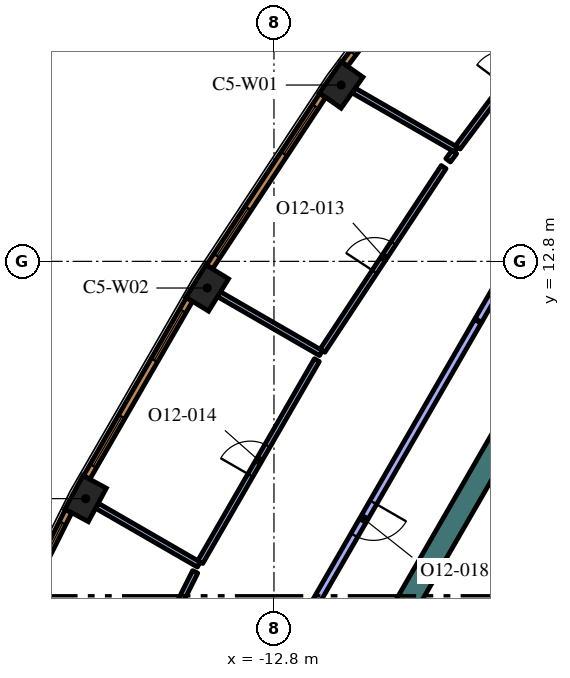
"""IFC4 building model, lengths in metres.
Left out: names, types, materials, properties, quantities, classifications, styles, units other than length and angle.
Written with IfcOpenShell. Run it as: python <this file> out.ifc"""

import sys

from ifc_helpers import new_model, si_unit, direction, frame, frame_2d, origin, origin_2d, place, context, subcontext, project, spatial, polyline, rectangle, outline, extrude, element, fill, save


model = new_model("IFC4")
c1 = context("Model", 3, precision=1e-05, world=origin(), true_north=direction((0.0, 1.0)))
c2 = subcontext(c1, "Body", "Model", "MODEL_VIEW")
j1 = project(units=[si_unit("LENGTHUNIT", "METRE"), si_unit("PLANEANGLEUNIT", "RADIAN")], contexts=[c1])
p1 = place(None, origin())
s1 = spatial("IfcSite", under=j1, at=p1, CompositionType="ELEMENT")
p2 = place(p1, origin())
s2 = spatial("IfcBuilding", under=s1, at=p2, CompositionType="ELEMENT")
p3 = place(p2, frame((0.0, 0.0, 283.8)))
s3 = spatial("IfcBuildingStorey", under=s2, at=p3, CompositionType="ELEMENT", Elevation=283.8)
for number, where, z_axis, x_axis in (
    (1, (-11.032, 17.44, 0.0), (0.0, 0.0, 1.0), (-0.575, -0.818, 0.0)),
    (2, (-14.556, 12.098, 0.0), (0.0, 0.0, 1.0), (-0.526, -0.851, 0.0)),
    (3, (-17.756, 6.557, 0.0), (0.0, 0.0, 1.0), (-0.474, -0.881, 0.0)),
):
    element("IfcColumn", number, at=place(p3, frame(where, z_axis=z_axis, x_axis=x_axis)), inside=s3, PredefinedType="COLUMN", context=c2, shape_type="SweptSolid", body=[
        extrude(rectangle(XDim=1.0, YDim=0.7, at=origin_2d()), origin(), (0.0, 0.0, 1.0), 4.2),
    ])
p4 = place(p3, origin())
e4 = element("IfcWall", 4, at=p4, inside=s3, PredefinedType="SOLIDWALL", context=c2, shape_type="SweptSolid", body=[
    extrude(outline(polyline([(-15.502, -6.35), (-4.912, 11.992), (-4.393, 11.692), (-10.815, 0.569), (-10.84, 0.583), (-10.84, 0.583), (-10.84, 0.583), (-10.965, 0.367), (-10.965, 0.367), (-10.965, 0.367), (-10.94, 0.352), (-11.033, 0.191), (-14.809, -6.35), (-15.156, -6.95), (-15.502, -6.35)])), origin(), (0.0, 0.0, 1.0), 4.2),
])
p5 = place(p3, frame((-8.06, -1.311, 0.0), z_axis=(0.0, 0.0, 1.0), x_axis=(0.50000273126, 0.866023826885, 0.0)))
e5 = element("IfcWall", 5, at=p5, inside=s3, PredefinedType="SOLIDWALL", context=c2, shape_type="SweptSolid", body=[
    extrude(rectangle(XDim=10.33, YDim=0.25, at=frame_2d((5.165, 0.0))), origin(), (0.0, 0.0, 1.0), 4.2),
])
p6 = place(p3, frame((-8.007, 15.74, 0.0), z_axis=(0.0, 0.0, 1.0), x_axis=(-0.866044607523, 0.499966736674, 0.0)))
e6 = element("IfcWall", 6, at=p6, inside=s3, PredefinedType="PARTITIONING", context=c2, shape_type="SweptSolid", body=[
    extrude(rectangle(XDim=3.115, YDim=0.15, at=frame_2d((1.557, 0.0))), origin(), (0.0, 0.0, 1.0), 3.55),
])
p7 = place(p3, frame((-7.962, 15.8, 0.0), z_axis=(0.0, 0.0, 1.0), x_axis=(0.599541489613, 0.800343677574, 0.0)))
e7 = element("IfcWall", 7, at=p7, inside=s3, PredefinedType="PARTITIONING", context=c2, shape_type="SweptSolid", body=[
    extrude(rectangle(XDim=4.942, YDim=0.15, at=frame_2d((2.471, 0.0))), origin(), (0.0, 0.0, 1.0), 3.55),
])
p8 = place(p7, frame((2.042, 0.0, 0.0)))
e8 = element("IfcOpeningElement", 8, at=p8, cuts=e7, PredefinedType="OPENING", context=c2, shape_type="SweptSolid", body=[
    extrude(rectangle(XDim=0.9, YDim=2.1, at=frame_2d((0.45, 1.05))), frame((0.0, 0.085, 0.0), z_axis=(0.0, -1.0, 0.0), x_axis=(1.0, 0.0, 0.0)), (0.0, 0.0, 1.0), 0.17),
])
p9 = place(p3, frame((-11.564, 10.387, 0.0), z_axis=(0.0, 0.0, 1.0), x_axis=(-0.86604641216, 0.499963610661, 0.0)))
e9 = element("IfcWall", 9, at=p9, inside=s3, PredefinedType="PARTITIONING", context=c2, shape_type="SweptSolid", body=[
    extrude(rectangle(XDim=3.096, YDim=0.15, at=frame_2d((1.548, 0.0))), origin(), (0.0, 0.0, 1.0), 3.55),
])
p10 = place(p3, frame((-8.052, 15.679, 0.0), z_axis=(0.0, 0.0, 1.0), x_axis=(-0.599004157744, -0.800745914136, 0.0)))
e10 = element("IfcWall", 10, at=p10, inside=s3, PredefinedType="PARTITIONING", context=c2, shape_type="SweptSolid", body=[
    extrude(rectangle(XDim=0.275, YDim=0.15, at=frame_2d((0.137, 0.0))), origin(), (0.0, 0.0, 1.0), 3.55),
])
p11 = place(p3, frame((-11.523, 10.449, 0.0), z_axis=(0.0, 0.0, 1.0), x_axis=(0.550751709023, 0.834669129061, 0.0)))
e11 = element("IfcWall", 11, at=p11, inside=s3, PredefinedType="PARTITIONING", context=c2, shape_type="SweptSolid", body=[
    extrude(rectangle(XDim=5.788, YDim=0.15, at=frame_2d((2.894, 0.0))), origin(), (0.0, 0.0, 1.0), 3.55),
])
p12 = place(p11, frame((2.488, 0.0, 0.0)))
e12 = element("IfcOpeningElement", 12, at=p12, cuts=e11, PredefinedType="OPENING", context=c2, shape_type="SweptSolid", body=[
    extrude(rectangle(XDim=0.9, YDim=2.1, at=frame_2d((0.45, 1.05))), frame((0.0, 0.085, 0.0), z_axis=(0.0, -1.0, 0.0), x_axis=(1.0, 0.0, 0.0)), (0.0, 0.0, 1.0), 0.17),
])
p13 = place(p3, frame((-14.777, 4.822, 0.0), z_axis=(0.0, 0.0, 1.0), x_axis=(-0.865992557167, 0.500056887695, 0.0)))
e13 = element("IfcWall", 13, at=p13, inside=s3, PredefinedType="PARTITIONING", context=c2, shape_type="SweptSolid", body=[
    extrude(rectangle(XDim=3.096, YDim=0.15, at=frame_2d((1.548, 0.0))), origin(), (0.0, 0.0, 1.0), 3.55),
])
p14 = place(p3, frame((-14.74, 4.887, 0.0), z_axis=(0.0, 0.0, 1.0), x_axis=(0.500007141444, 0.86602128063, 0.0)))
e14 = element("IfcWall", 14, at=p14, inside=s3, PredefinedType="PARTITIONING", context=c2, shape_type="SweptSolid", body=[
    extrude(rectangle(XDim=6.137, YDim=0.15, at=frame_2d((3.068, 0.0))), origin(), (0.0, 0.0, 1.0), 3.55),
])
p15 = place(p14, frame((2.637, 0.0, 0.0)))
e15 = element("IfcOpeningElement", 15, at=p15, cuts=e14, PredefinedType="OPENING", context=c2, shape_type="SweptSolid", body=[
    extrude(rectangle(XDim=0.9, YDim=2.1, at=frame_2d((0.45, 1.05))), frame((0.0, 0.085, 0.0), z_axis=(0.0, -1.0, 0.0), x_axis=(1.0, 0.0, 0.0)), (0.0, 0.0, 1.0), 0.17),
])
p16 = place(p3, frame((-17.497, -0.613, 0.0), z_axis=(0.0, 0.0, 1.0), x_axis=(0.447480081559, 0.89429389834, 0.0)))
e16 = element("IfcWall", 16, at=p16, inside=s3, PredefinedType="PARTITIONING", context=c2, shape_type="SweptSolid", body=[
    extrude(rectangle(XDim=5.863, YDim=0.15, at=frame_2d((2.931, 0.0))), origin(), (0.0, 0.0, 1.0), 3.55),
])
p17 = place(p16, frame((2.463, 0.0, 0.0)))
e17 = element("IfcOpeningElement", 17, at=p17, cuts=e16, PredefinedType="OPENING", context=c2, shape_type="SweptSolid", body=[
    extrude(rectangle(XDim=0.9, YDim=2.1, at=frame_2d((0.45, 1.05))), frame((0.0, 0.085, 0.0), z_axis=(0.0, -1.0, 0.0), x_axis=(1.0, 0.0, 0.0)), (0.0, 0.0, 1.0), 0.17),
])
p18 = place(p3, frame((-7.436, 11.221, 0.0), z_axis=(0.0, 0.0, 1.0), x_axis=(-0.49999894854, -0.866026010844, 0.0)))
e18 = element("IfcWall", 18, at=p18, inside=s3, PredefinedType="PARTITIONING", context=c2, shape_type="SweptSolid", body=[
    extrude(rectangle(XDim=12.0, YDim=0.2, at=frame_2d((6.0, 0.0))), origin(), (0.0, 0.0, 1.0), 3.55),
])
p19 = place(p18, frame((5.5, 0.0, 0.0)))
e19 = element("IfcOpeningElement", 19, at=p19, cuts=e18, PredefinedType="OPENING", context=c2, shape_type="SweptSolid", body=[
    extrude(rectangle(XDim=1.0, YDim=2.1, at=frame_2d((0.5, 1.05))), frame((0.0, 0.11, 0.0), z_axis=(0.0, -1.0, 0.0), x_axis=(1.0, 0.0, 0.0)), (0.0, 0.0, 1.0), 0.22),
])
p20 = place(p3, frame((-3.306, 18.374, 0.0), z_axis=(0.0, 0.0, 1.0), x_axis=(-0.499999798456, -0.866025520146, 0.0)))
e20 = element("IfcWall", 20, at=p20, inside=s3, PredefinedType="PARTITIONING", context=c2, shape_type="SweptSolid", body=[
    extrude(rectangle(XDim=8.229, YDim=0.2, at=frame_2d((4.115, 0.0))), origin(), (0.0, 0.0, 1.0), 3.55),
])
p21 = place(p3, frame((-7.692, 22.324, 0.0), z_axis=(0.0, 0.0, 1.0), x_axis=(-0.599559865294, -0.800329911929, 0.0)))
e21 = element("IfcWall", 21, at=p21, inside=s3, PredefinedType="SOLIDWALL", context=c2, shape_type="SweptSolid", body=[
    extrude(rectangle(XDim=5.415, YDim=0.19, at=frame_2d((2.708, 0.0))), origin(), (0.0, 0.0, 1.0), 3.95),
])
p22 = place(p21, frame((0.323, 0.0, 0.6)))
e22 = element("IfcOpeningElement", 22, at=p22, cuts=e21, PredefinedType="OPENING", context=c2, shape_type="SweptSolid", body=[
    extrude(rectangle(XDim=1.5, YDim=2.85, at=frame_2d((0.75, 1.425))), frame((0.0, 0.105, 0.0), z_axis=(0.0, -1.0, 0.0), x_axis=(1.0, 0.0, 0.0)), (0.0, 0.0, 1.0), 0.21),
])
p23 = place(p21, frame((3.558, 0.0, 0.6)))
e23 = element("IfcOpeningElement", 23, at=p23, cuts=e21, PredefinedType="OPENING", context=c2, shape_type="SweptSolid", body=[
    extrude(rectangle(XDim=1.5, YDim=2.85, at=frame_2d((0.75, 1.425))), frame((0.0, 0.105, 0.0), z_axis=(0.0, -1.0, 0.0), x_axis=(1.0, 0.0, 0.0)), (0.0, 0.0, 1.0), 0.21),
])
p24 = place(p3, frame((-11.518, 17.166, 0.0), z_axis=(0.0, 0.0, 1.0), x_axis=(-0.550744054781, -0.83467417962, 0.0)))
e24 = element("IfcWall", 24, at=p24, inside=s3, PredefinedType="SOLIDWALL", context=c2, shape_type="SweptSolid", body=[
    extrude(rectangle(XDim=5.406, YDim=0.19, at=frame_2d((2.703, 0.0))), origin(), (0.0, 0.0, 1.0), 3.95),
])
p25 = place(p24, frame((0.346, 0.0, 0.6)))
e25 = element("IfcOpeningElement", 25, at=p25, cuts=e24, PredefinedType="OPENING", context=c2, shape_type="SweptSolid", body=[
    extrude(rectangle(XDim=1.5, YDim=2.85, at=frame_2d((0.75, 1.425))), frame((0.0, 0.105, 0.0), z_axis=(0.0, -1.0, 0.0), x_axis=(1.0, 0.0, 0.0)), (0.0, 0.0, 1.0), 0.21),
])
p26 = place(p24, frame((3.559, 0.0, 0.6)))
e26 = element("IfcOpeningElement", 26, at=p26, cuts=e24, PredefinedType="OPENING", context=c2, shape_type="SweptSolid", body=[
    extrude(rectangle(XDim=1.5, YDim=2.85, at=frame_2d((0.75, 1.425))), frame((0.0, 0.105, 0.0), z_axis=(0.0, -1.0, 0.0), x_axis=(1.0, 0.0, 0.0)), (0.0, 0.0, 1.0), 0.21),
])
p27 = place(p3, frame((-15.025, 11.796, 0.0), z_axis=(0.0, 0.0, 1.0), x_axis=(-0.500024767483, -0.866011103799, 0.0)))
e27 = element("IfcWall", 27, at=p27, inside=s3, PredefinedType="SOLIDWALL", context=c2, shape_type="SweptSolid", body=[
    extrude(rectangle(XDim=5.406, YDim=0.19, at=frame_2d((2.703, 0.0))), origin(), (0.0, 0.0, 1.0), 3.95),
])
p28 = place(p27, frame((0.346, 0.0, 0.6)))
e28 = element("IfcOpeningElement", 28, at=p28, cuts=e27, PredefinedType="OPENING", context=c2, shape_type="SweptSolid", body=[
    extrude(rectangle(XDim=1.5, YDim=2.85, at=frame_2d((0.75, 1.425))), frame((0.0, 0.105, 0.0), z_axis=(0.0, -1.0, 0.0), x_axis=(1.0, 0.0, 0.0)), (0.0, 0.0, 1.0), 0.21),
])
p29 = place(p27, frame((3.559, 0.0, 0.6)))
e29 = element("IfcOpeningElement", 29, at=p29, cuts=e27, PredefinedType="OPENING", context=c2, shape_type="SweptSolid", body=[
    extrude(rectangle(XDim=1.5, YDim=2.85, at=frame_2d((0.75, 1.425))), frame((0.0, 0.105, 0.0), z_axis=(0.0, -1.0, 0.0), x_axis=(1.0, 0.0, 0.0)), (0.0, 0.0, 1.0), 0.21),
])
p30 = place(p3, frame((-18.206, 6.227, 0.0), z_axis=(0.0, 0.0, 1.0), x_axis=(-0.447484531401, -0.894291671747, 0.0)))
e30 = element("IfcWall", 30, at=p30, inside=s3, PredefinedType="SOLIDWALL", context=c2, shape_type="SweptSolid", body=[
    extrude(rectangle(XDim=5.406, YDim=0.19, at=frame_2d((2.703, 0.0))), origin(), (0.0, 0.0, 1.0), 3.95),
])
p31 = place(p30, frame((0.346, 0.0, 0.6)))
e31 = element("IfcOpeningElement", 31, at=p31, cuts=e30, PredefinedType="OPENING", context=c2, shape_type="SweptSolid", body=[
    extrude(rectangle(XDim=1.5, YDim=2.85, at=frame_2d((0.75, 1.425))), frame((0.0, 0.105, 0.0), z_axis=(0.0, -1.0, 0.0), x_axis=(1.0, 0.0, 0.0)), (0.0, 0.0, 1.0), 0.21),
])
p32 = place(p30, frame((3.559, 0.0, 0.6)))
e32 = element("IfcOpeningElement", 32, at=p32, cuts=e30, PredefinedType="OPENING", context=c2, shape_type="SweptSolid", body=[
    extrude(rectangle(XDim=1.5, YDim=2.85, at=frame_2d((0.75, 1.425))), frame((0.0, 0.105, 0.0), z_axis=(0.0, -1.0, 0.0), x_axis=(1.0, 0.0, 0.0)), (0.0, 0.0, 1.0), 0.21),
])
p33 = place(p12, origin())
e33 = element("IfcDoor", 33, at=p33, inside=s3, OperationType="SINGLE_SWING_RIGHT", PredefinedType="DOOR", context=c2, shape_type="SweptSolid", body=[
    extrude(rectangle(XDim=0.9, YDim=2.1, at=frame_2d((0.45, 1.05))), frame((0.0, 0.025, 0.0), z_axis=(0.0, -1.0, 0.0), x_axis=(1.0, 0.0, 0.0)), (0.0, 0.0, 1.0), 0.05),
])
fill(e12, e33)
p34 = place(p15, origin())
e34 = element("IfcDoor", 34, at=p34, inside=s3, OperationType="SINGLE_SWING_RIGHT", PredefinedType="DOOR", context=c2, shape_type="SweptSolid", body=[
    extrude(rectangle(XDim=0.9, YDim=2.1, at=frame_2d((0.45, 1.05))), frame((0.0, 0.025, 0.0), z_axis=(0.0, -1.0, 0.0), x_axis=(1.0, 0.0, 0.0)), (0.0, 0.0, 1.0), 0.05),
])
fill(e15, e34)
p35 = place(p19, origin())
e35 = element("IfcDoor", 35, at=p35, inside=s3, OperationType="SINGLE_SWING_RIGHT", PredefinedType="DOOR", context=c2, shape_type="SweptSolid", body=[
    extrude(rectangle(XDim=1.0, YDim=2.1, at=frame_2d((0.5, 1.05))), frame((0.0, 0.025, 0.0), z_axis=(0.0, -1.0, 0.0), x_axis=(1.0, 0.0, 0.0)), (0.0, 0.0, 1.0), 0.05),
])
fill(e19, e35)
p36 = place(p23, origin())
e36 = element("IfcWindow", 36, at=p36, inside=s3, PartitioningType="SINGLE_PANEL", PredefinedType="WINDOW", context=c2, shape_type="SweptSolid", body=[
    extrude(rectangle(XDim=1.5, YDim=2.85, at=frame_2d((0.75, 1.425))), frame((0.0, 0.045, 0.0), z_axis=(0.0, -1.0, 0.0), x_axis=(1.0, 0.0, 0.0)), (0.0, 0.0, 1.0), 0.06),
])
fill(e23, e36)
p37 = place(p25, origin())
e37 = element("IfcWindow", 37, at=p37, inside=s3, PartitioningType="SINGLE_PANEL", PredefinedType="WINDOW", context=c2, shape_type="SweptSolid", body=[
    extrude(rectangle(XDim=1.5, YDim=2.85, at=frame_2d((0.75, 1.425))), frame((0.0, 0.045, 0.0), z_axis=(0.0, -1.0, 0.0), x_axis=(1.0, 0.0, 0.0)), (0.0, 0.0, 1.0), 0.06),
])
fill(e25, e37)
p38 = place(p26, origin())
e38 = element("IfcWindow", 38, at=p38, inside=s3, PartitioningType="SINGLE_PANEL", PredefinedType="WINDOW", context=c2, shape_type="SweptSolid", body=[
    extrude(rectangle(XDim=1.5, YDim=2.85, at=frame_2d((0.75, 1.425))), frame((0.0, 0.045, 0.0), z_axis=(0.0, -1.0, 0.0), x_axis=(1.0, 0.0, 0.0)), (0.0, 0.0, 1.0), 0.06),
])
fill(e26, e38)
p39 = place(p28, origin())
e39 = element("IfcWindow", 39, at=p39, inside=s3, PartitioningType="SINGLE_PANEL", PredefinedType="WINDOW", context=c2, shape_type="SweptSolid", body=[
    extrude(rectangle(XDim=1.5, YDim=2.85, at=frame_2d((0.75, 1.425))), frame((0.0, 0.045, 0.0), z_axis=(0.0, -1.0, 0.0), x_axis=(1.0, 0.0, 0.0)), (0.0, 0.0, 1.0), 0.06),
])
fill(e28, e39)
p40 = place(p29, origin())
e40 = element("IfcWindow", 40, at=p40, inside=s3, PartitioningType="SINGLE_PANEL", PredefinedType="WINDOW", context=c2, shape_type="SweptSolid", body=[
    extrude(rectangle(XDim=1.5, YDim=2.85, at=frame_2d((0.75, 1.425))), frame((0.0, 0.045, 0.0), z_axis=(0.0, -1.0, 0.0), x_axis=(1.0, 0.0, 0.0)), (0.0, 0.0, 1.0), 0.06),
])
fill(e29, e40)
p41 = place(p31, origin())
e41 = element("IfcWindow", 41, at=p41, inside=s3, PartitioningType="SINGLE_PANEL", PredefinedType="WINDOW", context=c2, shape_type="SweptSolid", body=[
    extrude(rectangle(XDim=1.5, YDim=2.85, at=frame_2d((0.75, 1.425))), frame((0.0, 0.045, 0.0), z_axis=(0.0, -1.0, 0.0), x_axis=(1.0, 0.0, 0.0)), (0.0, 0.0, 1.0), 0.06),
])
fill(e31, e41)
save(model, sys.argv[1])
